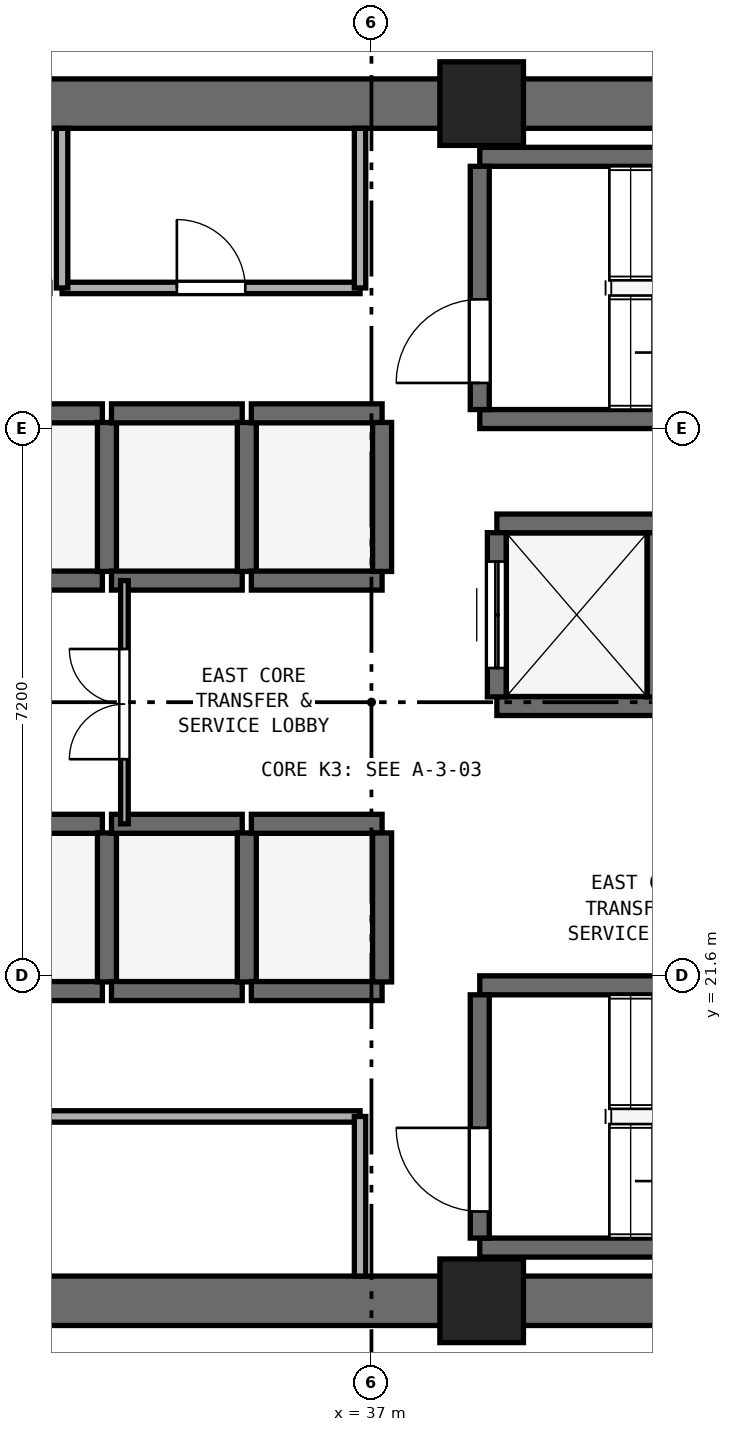
"""IFC4 building model, lengths in metres.
Left out: names, types, materials, properties, quantities, classifications, styles, units other than length and angle.
Written with IfcOpenShell. Run it as: python <this file> out.ifc"""

import sys

from ifc_helpers import new_model, si_unit, direction, frame, frame_2d, origin, origin_2d, place, context, subcontext, project, spatial, rectangle, extrude, element, fill, save


model = new_model("IFC4")
c1 = context("Model", 3, precision=1e-05, world=origin(), true_north=direction((0.0, 1.0)))
c2 = subcontext(c1, "Body", "Model", "MODEL_VIEW")
j1 = project(units=[si_unit("LENGTHUNIT", "METRE"), si_unit("PLANEANGLEUNIT", "RADIAN")], contexts=[c1])
p1 = place(None, origin())
s1 = spatial("IfcSite", under=j1, at=p1, CompositionType="ELEMENT")
p2 = place(p1, origin())
s2 = spatial("IfcBuilding", under=s1, at=p2, CompositionType="ELEMENT")
p3 = place(p2, frame((0.0, 0.0, 66.8)))
s3 = spatial("IfcBuildingStorey", under=s2, at=p3, CompositionType="ELEMENT", Elevation=66.8)
for number, where, z_axis, x_axis in (
    (1, (25.4, 17.325, 0.0), (0.0, 0.0, 1.0), (1.0, 0.0, 0.0)),
    (2, (25.4, 33.075, 0.0), (0.0, 0.0, 1.0), (1.0, 0.0, 0.0)),
):
    element("IfcWall", number, at=place(p3, frame(where, z_axis=z_axis, x_axis=x_axis)), inside=s3, PredefinedType="SHEAR", context=c2, shape_type="SweptSolid", body=[
        extrude(rectangle(XDim=23.2, YDim=0.65, at=frame_2d((11.6, 0.0))), origin(), (0.0, 0.0, 1.0), 3.525),
    ])
for number, where, z_axis, x_axis in (
    (3, (38.45, 17.325, 0.0), (0.0, 0.0, 1.0), (1.0, 0.0, 0.0)),
    (4, (38.45, 33.075, 0.0), (0.0, 0.0, 1.0), (1.0, 0.0, 0.0)),
):
    element("IfcColumn", number, at=place(p3, frame(where, z_axis=z_axis, x_axis=x_axis)), inside=s3, PredefinedType="PILASTER", context=c2, shape_type="SweptSolid", body=[
        extrude(rectangle(XDim=1.1, YDim=1.1, at=origin_2d()), origin(), (0.0, 0.0, 1.0), 3.8),
    ])
for number, where, z_axis, x_axis in (
    (5, (38.425, 28.925, 0.0), (0.0, 0.0, 1.0), (1.0, 0.0, 0.0)),
    (6, (38.425, 32.375, 0.0), (0.0, 0.0, 1.0), (1.0, 0.0, 0.0)),
):
    element("IfcWall", number, at=place(p3, frame(where, z_axis=z_axis, x_axis=x_axis)), inside=s3, PredefinedType="SHEAR", context=c2, shape_type="SweptSolid", body=[
        extrude(rectangle(XDim=7.3, YDim=0.25, at=frame_2d((3.65, 0.0))), origin(), (0.0, 0.0, 1.0), 3.525),
    ])
p4 = place(p3, frame((38.425, 29.05, 0.0), z_axis=(0.0, 0.0, 1.0), x_axis=(0.0, 1.0, 0.0)))
e7 = element("IfcWall", 7, at=p4, inside=s3, PredefinedType="SHEAR", context=c2, shape_type="SweptSolid", body=[
    extrude(rectangle(XDim=3.2, YDim=0.25, at=frame_2d((1.6, 0.0))), origin(), (0.0, 0.0, 1.0), 3.525),
])
p5 = place(p4, frame((0.35, 0.0, 0.0)))
e8 = element("IfcOpeningElement", 8, at=p5, cuts=e7, PredefinedType="OPENING", context=c2, shape_type="SweptSolid", body=[
    extrude(rectangle(XDim=1.1, YDim=2.15, at=frame_2d((0.55, 1.075))), frame((0.0, 0.135, 0.0), z_axis=(0.0, -1.0, 0.0), x_axis=(1.0, 0.0, 0.0)), (0.0, 0.0, 1.0), 0.27),
])
for number, where, z_axis, x_axis in (
    (9, (38.425, 18.025, 0.0), (0.0, 0.0, 1.0), (1.0, 0.0, 0.0)),
    (10, (38.425, 21.475, 0.0), (0.0, 0.0, 1.0), (1.0, 0.0, 0.0)),
):
    element("IfcWall", number, at=place(p3, frame(where, z_axis=z_axis, x_axis=x_axis)), inside=s3, PredefinedType="SHEAR", context=c2, shape_type="SweptSolid", body=[
        extrude(rectangle(XDim=7.3, YDim=0.25, at=frame_2d((3.65, 0.0))), origin(), (0.0, 0.0, 1.0), 3.525),
    ])
p6 = place(p3, frame((38.425, 18.15, 0.0), z_axis=(0.0, 0.0, 1.0), x_axis=(0.0, 1.0, 0.0)))
e11 = element("IfcWall", 11, at=p6, inside=s3, PredefinedType="SHEAR", context=c2, shape_type="SweptSolid", body=[
    extrude(rectangle(XDim=3.2, YDim=0.25, at=frame_2d((1.6, 0.0))), origin(), (0.0, 0.0, 1.0), 3.525),
])
p7 = place(p6, frame((0.35, 0.0, 0.0)))
e12 = element("IfcOpeningElement", 12, at=p7, cuts=e11, PredefinedType="OPENING", context=c2, shape_type="SweptSolid", body=[
    extrude(rectangle(XDim=1.1, YDim=2.15, at=frame_2d((0.55, 1.075))), frame((0.0, 0.135, 0.0), z_axis=(0.0, -1.0, 0.0), x_axis=(1.0, 0.0, 0.0)), (0.0, 0.0, 1.0), 0.27),
])
for number, where, z_axis, x_axis in (
    (13, (31.74, 21.4, 0.0), (0.0, 0.0, 1.0), (1.0, 0.0, 0.0)),
    (14, (31.74, 23.6, 0.0), (0.0, 0.0, 1.0), (1.0, 0.0, 0.0)),
):
    element("IfcWall", number, at=place(p3, frame(where, z_axis=z_axis, x_axis=x_axis)), inside=s3, PredefinedType="SHEAR", context=c2, shape_type="SweptSolid", body=[
        extrude(rectangle(XDim=1.72, YDim=0.25, at=frame_2d((0.86, 0.0))), origin(), (0.0, 0.0, 1.0), 3.525),
    ])
p8 = place(p3, frame((33.52, 21.52, 0.0), z_axis=(0.0, 0.0, 1.0), x_axis=(0.0, 1.0, 0.0)))
e15 = element("IfcWall", 15, at=p8, inside=s3, PredefinedType="SHEAR", context=c2, shape_type="SweptSolid", body=[
    extrude(rectangle(XDim=1.96, YDim=0.25, at=frame_2d((0.98, 0.0))), origin(), (0.0, 0.0, 1.0), 3.525),
])
for number, where, z_axis, x_axis in (
    (16, (33.58, 21.4, 0.0), (0.0, 0.0, 1.0), (1.0, 0.0, 0.0)),
    (17, (33.58, 23.6, 0.0), (0.0, 0.0, 1.0), (1.0, 0.0, 0.0)),
):
    element("IfcWall", number, at=place(p3, frame(where, z_axis=z_axis, x_axis=x_axis)), inside=s3, PredefinedType="SHEAR", context=c2, shape_type="SweptSolid", body=[
        extrude(rectangle(XDim=1.72, YDim=0.25, at=frame_2d((0.86, 0.0))), origin(), (0.0, 0.0, 1.0), 3.525),
    ])
p9 = place(p3, frame((35.36, 21.52, 0.0), z_axis=(0.0, 0.0, 1.0), x_axis=(0.0, 1.0, 0.0)))
e18 = element("IfcWall", 18, at=p9, inside=s3, PredefinedType="SHEAR", context=c2, shape_type="SweptSolid", body=[
    extrude(rectangle(XDim=1.96, YDim=0.25, at=frame_2d((0.98, 0.0))), origin(), (0.0, 0.0, 1.0), 3.525),
])
for number, where, z_axis, x_axis in (
    (19, (35.42, 21.4, 0.0), (0.0, 0.0, 1.0), (1.0, 0.0, 0.0)),
    (20, (35.42, 23.6, 0.0), (0.0, 0.0, 1.0), (1.0, 0.0, 0.0)),
):
    element("IfcWall", number, at=place(p3, frame(where, z_axis=z_axis, x_axis=x_axis)), inside=s3, PredefinedType="SHEAR", context=c2, shape_type="SweptSolid", body=[
        extrude(rectangle(XDim=1.72, YDim=0.25, at=frame_2d((0.86, 0.0))), origin(), (0.0, 0.0, 1.0), 3.525),
    ])
p10 = place(p3, frame((37.14, 21.52, 0.0), z_axis=(0.0, 0.0, 1.0), x_axis=(0.0, 1.0, 0.0)))
e21 = element("IfcWall", 21, at=p10, inside=s3, PredefinedType="SHEAR", context=c2, shape_type="SweptSolid", body=[
    extrude(rectangle(XDim=1.96, YDim=0.25, at=frame_2d((0.98, 0.0))), origin(), (0.0, 0.0, 1.0), 3.525),
])
for number, where, z_axis, x_axis in (
    (22, (31.74, 26.8, 0.0), (0.0, 0.0, 1.0), (1.0, 0.0, 0.0)),
    (23, (31.74, 29.0, 0.0), (0.0, 0.0, 1.0), (1.0, 0.0, 0.0)),
):
    element("IfcWall", number, at=place(p3, frame(where, z_axis=z_axis, x_axis=x_axis)), inside=s3, PredefinedType="SHEAR", context=c2, shape_type="SweptSolid", body=[
        extrude(rectangle(XDim=1.72, YDim=0.25, at=frame_2d((0.86, 0.0))), origin(), (0.0, 0.0, 1.0), 3.525),
    ])
p11 = place(p3, frame((33.52, 26.92, 0.0), z_axis=(0.0, 0.0, 1.0), x_axis=(0.0, 1.0, 0.0)))
e24 = element("IfcWall", 24, at=p11, inside=s3, PredefinedType="SHEAR", context=c2, shape_type="SweptSolid", body=[
    extrude(rectangle(XDim=1.96, YDim=0.25, at=frame_2d((0.98, 0.0))), origin(), (0.0, 0.0, 1.0), 3.525),
])
for number, where, z_axis, x_axis in (
    (25, (33.58, 26.8, 0.0), (0.0, 0.0, 1.0), (1.0, 0.0, 0.0)),
    (26, (33.58, 29.0, 0.0), (0.0, 0.0, 1.0), (1.0, 0.0, 0.0)),
):
    element("IfcWall", number, at=place(p3, frame(where, z_axis=z_axis, x_axis=x_axis)), inside=s3, PredefinedType="SHEAR", context=c2, shape_type="SweptSolid", body=[
        extrude(rectangle(XDim=1.72, YDim=0.25, at=frame_2d((0.86, 0.0))), origin(), (0.0, 0.0, 1.0), 3.525),
    ])
p12 = place(p3, frame((35.36, 26.92, 0.0), z_axis=(0.0, 0.0, 1.0), x_axis=(0.0, 1.0, 0.0)))
e27 = element("IfcWall", 27, at=p12, inside=s3, PredefinedType="SHEAR", context=c2, shape_type="SweptSolid", body=[
    extrude(rectangle(XDim=1.96, YDim=0.25, at=frame_2d((0.98, 0.0))), origin(), (0.0, 0.0, 1.0), 3.525),
])
for number, where, z_axis, x_axis in (
    (28, (35.42, 26.8, 0.0), (0.0, 0.0, 1.0), (1.0, 0.0, 0.0)),
    (29, (35.42, 29.0, 0.0), (0.0, 0.0, 1.0), (1.0, 0.0, 0.0)),
):
    element("IfcWall", number, at=place(p3, frame(where, z_axis=z_axis, x_axis=x_axis)), inside=s3, PredefinedType="SHEAR", context=c2, shape_type="SweptSolid", body=[
        extrude(rectangle(XDim=1.72, YDim=0.25, at=frame_2d((0.86, 0.0))), origin(), (0.0, 0.0, 1.0), 3.525),
    ])
p13 = place(p3, frame((37.14, 26.92, 0.0), z_axis=(0.0, 0.0, 1.0), x_axis=(0.0, 1.0, 0.0)))
e30 = element("IfcWall", 30, at=p13, inside=s3, PredefinedType="SHEAR", context=c2, shape_type="SweptSolid", body=[
    extrude(rectangle(XDim=1.96, YDim=0.25, at=frame_2d((0.98, 0.0))), origin(), (0.0, 0.0, 1.0), 3.525),
])
for number, where, z_axis, x_axis in (
    (31, (38.65, 25.15, 0.0), (0.0, 0.0, 1.0), (1.0, 0.0, 0.0)),
    (32, (38.65, 27.55, 0.0), (0.0, 0.0, 1.0), (1.0, 0.0, 0.0)),
):
    element("IfcWall", number, at=place(p3, frame(where, z_axis=z_axis, x_axis=x_axis)), inside=s3, PredefinedType="SHEAR", context=c2, shape_type="SweptSolid", body=[
        extrude(rectangle(XDim=2.1, YDim=0.25, at=frame_2d((1.05, 0.0))), origin(), (0.0, 0.0, 1.0), 3.525),
    ])
p14 = place(p3, frame((38.65, 25.27, 0.0), z_axis=(0.0, 0.0, 1.0), x_axis=(0.0, 1.0, 0.0)))
e33 = element("IfcWall", 33, at=p14, inside=s3, PredefinedType="SHEAR", context=c2, shape_type="SweptSolid", body=[
    extrude(rectangle(XDim=2.16, YDim=0.25, at=frame_2d((1.08, 0.0))), origin(), (0.0, 0.0, 1.0), 3.525),
])
p15 = place(p14, frame((0.38, 0.0, 0.0)))
e34 = element("IfcOpeningElement", 34, at=p15, cuts=e33, PredefinedType="OPENING", context=c2, shape_type="SweptSolid", body=[
    extrude(rectangle(XDim=1.4, YDim=2.2, at=frame_2d((0.7, 1.1))), frame((0.0, 0.135, 0.0), z_axis=(0.0, -1.0, 0.0), x_axis=(1.0, 0.0, 0.0)), (0.0, 0.0, 1.0), 0.27),
])
p16 = place(p3, frame((40.75, 25.27, 0.0), z_axis=(0.0, 0.0, 1.0), x_axis=(0.0, 1.0, 0.0)))
e35 = element("IfcWall", 35, at=p16, inside=s3, PredefinedType="SHEAR", context=c2, shape_type="SweptSolid", body=[
    extrude(rectangle(XDim=2.16, YDim=0.25, at=frame_2d((1.08, 0.0))), origin(), (0.0, 0.0, 1.0), 3.525),
])
p17 = place(p3, frame((32.93, 30.65, 0.0), z_axis=(0.0, 0.0, 1.0), x_axis=(1.0, 0.0, 0.0)))
e36 = element("IfcWall", 36, at=p17, inside=s3, PredefinedType="PARTITIONING", context=c2, shape_type="SweptSolid", body=[
    extrude(rectangle(XDim=3.92, YDim=0.15, at=frame_2d((1.96, 0.0))), origin(), (0.0, 0.0, 1.0), 3.525),
])
p18 = place(p17, frame((1.51, 0.0, 0.0)))
e37 = element("IfcOpeningElement", 37, at=p18, cuts=e36, PredefinedType="OPENING", context=c2, shape_type="SweptSolid", body=[
    extrude(rectangle(XDim=0.9, YDim=2.1, at=frame_2d((0.45, 1.05))), frame((0.0, 0.085, 0.0), z_axis=(0.0, -1.0, 0.0), x_axis=(1.0, 0.0, 0.0)), (0.0, 0.0, 1.0), 0.17),
])
for number, where, z_axis, x_axis in (
    (38, (32.93, 30.65, 0.0), (0.0, 0.0, 1.0), (0.0, 1.0, 0.0)),
    (39, (36.85, 30.65, 0.0), (0.0, 0.0, 1.0), (0.0, 1.0, 0.0)),
):
    element("IfcWall", number, at=place(p3, frame(where, z_axis=z_axis, x_axis=x_axis)), inside=s3, PredefinedType="PARTITIONING", context=c2, shape_type="SweptSolid", body=[
        extrude(rectangle(XDim=2.1, YDim=0.15, at=frame_2d((1.05, 0.0))), origin(), (0.0, 0.0, 1.0), 3.525),
    ])
p19 = place(p3, frame((26.17, 19.75, 0.0), z_axis=(0.0, 0.0, 1.0), x_axis=(1.0, 0.0, 0.0)))
e40 = element("IfcWall", 40, at=p19, inside=s3, PredefinedType="PARTITIONING", context=c2, shape_type="SweptSolid", body=[
    extrude(rectangle(XDim=10.68, YDim=0.15, at=frame_2d((5.34, 0.0))), origin(), (0.0, 0.0, 1.0), 3.525),
])
p20 = place(p19, frame((4.865, 0.0, 0.0)))
e41 = element("IfcOpeningElement", 41, at=p20, cuts=e40, PredefinedType="OPENING", context=c2, shape_type="SweptSolid", body=[
    extrude(rectangle(XDim=0.95, YDim=2.1, at=frame_2d((0.475, 1.05))), frame((0.0, 0.085, 0.0), z_axis=(0.0, -1.0, 0.0), x_axis=(1.0, 0.0, 0.0)), (0.0, 0.0, 1.0), 0.17),
])
p21 = place(p3, frame((36.85, 17.65, 0.0), z_axis=(0.0, 0.0, 1.0), x_axis=(0.0, 1.0, 0.0)))
e42 = element("IfcWall", 42, at=p21, inside=s3, PredefinedType="PARTITIONING", context=c2, shape_type="SweptSolid", body=[
    extrude(rectangle(XDim=2.1, YDim=0.15, at=frame_2d((1.05, 0.0))), origin(), (0.0, 0.0, 1.0), 3.525),
])
p22 = place(p3, frame((33.75, 23.6, 0.0), z_axis=(0.0, 0.0, 1.0), x_axis=(0.0, 1.0, 0.0)))
e43 = element("IfcWall", 43, at=p22, inside=s3, PredefinedType="PARTITIONING", context=c2, shape_type="SweptSolid", body=[
    extrude(rectangle(XDim=3.2, YDim=0.1, at=frame_2d((1.6, 0.0))), origin(), (0.0, 0.0, 1.0), 3.525),
])
p23 = place(p22, frame((0.85, 0.0, 0.0)))
e44 = element("IfcOpeningElement", 44, at=p23, cuts=e43, PredefinedType="OPENING", context=c2, shape_type="SweptSolid", body=[
    extrude(rectangle(XDim=1.45, YDim=2.12, at=frame_2d((0.725, 1.06))), frame((0.0, 0.06, 0.0), z_axis=(0.0, -1.0, 0.0), x_axis=(1.0, 0.0, 0.0)), (0.0, 0.0, 1.0), 0.12),
])
p24 = place(p5, origin())
e45 = element("IfcDoor", 45, at=p24, inside=s3, OperationType="SINGLE_SWING_LEFT", PredefinedType="DOOR", context=c2, shape_type="SweptSolid", body=[
    extrude(rectangle(XDim=1.1, YDim=2.15, at=frame_2d((0.55, 1.075))), frame((0.0, 0.025, 0.0), z_axis=(0.0, -1.0, 0.0), x_axis=(1.0, 0.0, 0.0)), (0.0, 0.0, 1.0), 0.05),
])
fill(e8, e45)
p25 = place(p7, origin())
e46 = element("IfcDoor", 46, at=p25, inside=s3, OperationType="SINGLE_SWING_RIGHT", PredefinedType="DOOR", context=c2, shape_type="SweptSolid", body=[
    extrude(rectangle(XDim=1.1, YDim=2.15, at=frame_2d((0.55, 1.075))), frame((0.0, 0.025, 0.0), z_axis=(0.0, -1.0, 0.0), x_axis=(1.0, 0.0, 0.0)), (0.0, 0.0, 1.0), 0.05),
])
fill(e12, e46)
p26 = place(p15, origin())
e47 = element("IfcDoor", 47, at=p26, inside=s3, OperationType="DOUBLE_DOOR_SLIDING", PredefinedType="DOOR", context=c2, shape_type="SweptSolid", body=[
    extrude(rectangle(XDim=1.4, YDim=2.2, at=frame_2d((0.7, 1.1))), frame((0.0, 0.025, 0.0), z_axis=(0.0, -1.0, 0.0), x_axis=(1.0, 0.0, 0.0)), (0.0, 0.0, 1.0), 0.05),
])
fill(e34, e47)
p27 = place(p18, origin())
e48 = element("IfcDoor", 48, at=p27, inside=s3, OperationType="SINGLE_SWING_LEFT", PredefinedType="DOOR", context=c2, shape_type="SweptSolid", body=[
    extrude(rectangle(XDim=0.9, YDim=2.1, at=frame_2d((0.45, 1.05))), frame((0.0, 0.025, 0.0), z_axis=(0.0, -1.0, 0.0), x_axis=(1.0, 0.0, 0.0)), (0.0, 0.0, 1.0), 0.05),
])
fill(e37, e48)
p28 = place(p23, origin())
e49 = element("IfcDoor", 49, at=p28, inside=s3, OperationType="DOUBLE_DOOR_SINGLE_SWING", PredefinedType="DOOR", context=c2, shape_type="SweptSolid", body=[
    extrude(rectangle(XDim=1.45, YDim=2.12, at=frame_2d((0.725, 1.06))), frame((0.0, 0.025, 0.0), z_axis=(0.0, -1.0, 0.0), x_axis=(1.0, 0.0, 0.0)), (0.0, 0.0, 1.0), 0.05),
])
fill(e44, e49)
save(model, sys.argv[1])
